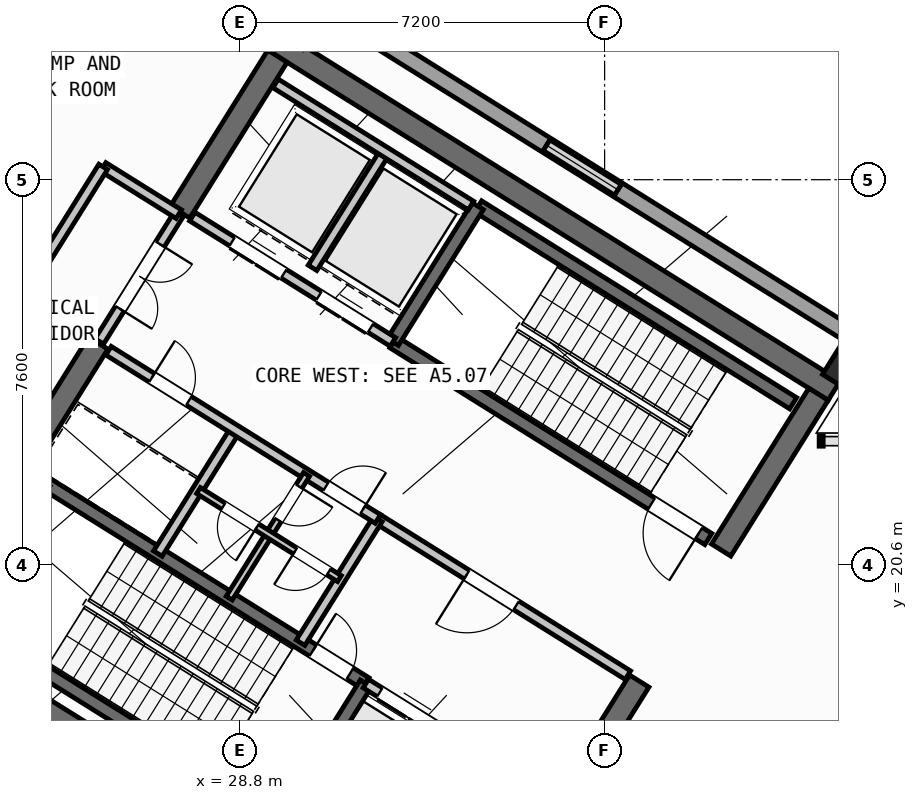
"""IFC4 building model, lengths in metres.
Left out: names, types, materials, properties, quantities, classifications, styles, units other than length and angle.
Written with IfcOpenShell. Run it as: python <this file> out.ifc"""

import sys

from ifc_helpers import new_model, si_unit, direction, frame, frame_2d, origin, origin_2d, place, context, subcontext, project, spatial, rectangle, hollow_rectangle, extrude, source, transform, mapped, element, fill, save


model = new_model("IFC4")
c1 = context("Model", 3, precision=1e-05, world=origin(), true_north=direction((0.0, 1.0)))
c2 = subcontext(c1, "Body", "Model", "MODEL_VIEW")
j1 = project(units=[si_unit("LENGTHUNIT", "METRE"), si_unit("PLANEANGLEUNIT", "RADIAN")], contexts=[c1])
p1 = place(None, origin())
s1 = spatial("IfcSite", under=j1, at=p1, CompositionType="ELEMENT")
p2 = place(p1, origin())
s2 = spatial("IfcBuilding", under=s1, at=p2, CompositionType="ELEMENT")
p3 = place(p2, frame((0.0, 0.0, 245.7)))
s3 = spatial("IfcBuildingStorey", under=s2, at=p3, CompositionType="ELEMENT", Elevation=245.7)
p4 = place(p3, frame((40.531, 24.036, 0.0), z_axis=(0.0, 0.0, 1.0), x_axis=(-0.848048787466, 0.529918157905, 0.0)))
e1 = element("IfcWall", 1, at=p4, inside=s3, PredefinedType="SHEAR", context=c2, shape_type="SweptSolid", body=[
    extrude(rectangle(XDim=13.04, YDim=0.45, at=frame_2d((6.52, 0.0))), origin(), (0.0, 0.0, 1.0), 5.15),
])
p5 = place(p3, frame((33.324, 12.503, 0.0), z_axis=(0.0, 0.0, 1.0), x_axis=(-0.848043529849, 0.529926571782, 0.0)))
e2 = element("IfcWall", 2, at=p5, inside=s3, PredefinedType="SHEAR", context=c2, shape_type="SweptSolid", body=[
    extrude(rectangle(XDim=13.04, YDim=0.45, at=frame_2d((6.52, 0.0))), origin(), (0.0, 0.0, 1.0), 5.15),
])
p6 = place(p3, frame((40.221, 23.965, 0.0), z_axis=(0.0, 0.0, 1.0), x_axis=(-0.529902075036, -0.848058836916, 0.0)))
e3 = element("IfcWall", 3, at=p6, inside=s3, PredefinedType="SHEAR", context=c2, shape_type="SweptSolid", body=[
    extrude(rectangle(XDim=3.625, YDim=0.45, at=frame_2d((1.812, 0.0))), origin(), (0.0, 0.0, 1.0), 5.15),
])
p7 = place(p3, frame((36.683, 18.304, 0.0), z_axis=(0.0, 0.0, 1.0), x_axis=(-0.529904039071, -0.848057609704, 0.0)))
e4 = element("IfcWall", 4, at=p7, inside=s3, PredefinedType="SHEAR", context=c2, shape_type="SweptSolid", body=[
    extrude(rectangle(XDim=6.475, YDim=0.45, at=frame_2d((3.238, 0.0))), origin(), (0.0, 0.0, 1.0), 5.15),
])
p8 = place(p3, frame((29.544, 30.636, 0.0), z_axis=(0.0, 0.0, 1.0), x_axis=(-0.529902075036, -0.848058836916, 0.0)))
e5 = element("IfcWall", 5, at=p8, inside=s3, PredefinedType="SHEAR", context=c2, shape_type="SweptSolid", body=[
    extrude(rectangle(XDim=3.625, YDim=0.45, at=frame_2d((1.812, 0.0))), origin(), (0.0, 0.0, 1.0), 5.15),
])
p9 = place(p3, frame((26.007, 24.976, 0.0), z_axis=(0.0, 0.0, 1.0), x_axis=(-0.529931155655, -0.848040665456, 0.0)))
e6 = element("IfcWall", 6, at=p9, inside=s3, PredefinedType="SHEAR", context=c2, shape_type="SweptSolid", body=[
    extrude(rectangle(XDim=6.475, YDim=0.45, at=frame_2d((3.238, 0.0))), origin(), (0.0, 0.0, 1.0), 5.15),
])
m1 = source(origin(), c2, "Body", "SweptSolid", [
    extrude(hollow_rectangle(XDim=0.7, YDim=0.7, WallThickness=0.028, at=origin_2d()), origin(), (0.0, 0.0, 1.0), 5.4),
])
p10 = place(p3, frame((40.783, 24.469, 0.0), z_axis=(0.0, 0.0, 1.0), x_axis=(-0.848048096156, 0.529919264233, 0.0)))
e7 = element("IfcColumn", 7, at=p10, inside=s3, PredefinedType="COLUMN", context=c2, shape_type="MappedRepresentation", body=[
    mapped(m1, transform((0.0, 0.0, 0.0), scale=1.0)),
])
p11 = place(p3, frame((29.268, 6.429, 0.0), z_axis=(0.0, 0.0, 1.0), x_axis=(-0.848049971435, 0.529916263149, 0.0)))
e8 = element("IfcWall", 8, at=p11, inside=s3, PredefinedType="STANDARD", context=c2, shape_type="SweptSolid", body=[
    extrude(rectangle(XDim=31.588, YDim=0.32, at=frame_2d((15.794, 0.0))), origin(), (0.0, 0.0, 1.0), 5.15),
])
p12 = place(p11, frame((5.782, 0.0, 0.85)))
e9 = element("IfcOpeningElement", 9, at=p12, cuts=e8, PredefinedType="OPENING", context=c2, shape_type="SweptSolid", body=[
    extrude(rectangle(XDim=1.7, YDim=1.6, at=frame_2d((0.85, 0.8))), frame((0.0, 0.17, 0.0), z_axis=(0.0, -1.0, 0.0), x_axis=(1.0, 0.0, 0.0)), (0.0, 0.0, 1.0), 0.34),
])
p13 = place(p3, frame((14.138, 41.825, 0.0), z_axis=(0.0, 0.0, 1.0), x_axis=(0.848046498049, -0.529921821731, 0.0)))
e10 = element("IfcWall", 10, at=p13, inside=s3, PredefinedType="STANDARD", context=c2, shape_type="SweptSolid", body=[
    extrude(rectangle(XDim=31.588, YDim=0.32, at=frame_2d((15.794, 0.0))), origin(), (0.0, 0.0, 1.0), 5.15),
])
p14 = place(p13, frame((2.144, 0.0, 0.85)))
e11 = element("IfcOpeningElement", 11, at=p14, cuts=e10, PredefinedType="OPENING", context=c2, shape_type="SweptSolid", body=[
    extrude(rectangle(XDim=1.7, YDim=1.6, at=frame_2d((0.85, 0.8))), frame((0.0, 0.17, 0.0), z_axis=(0.0, -1.0, 0.0), x_axis=(1.0, 0.0, 0.0)), (0.0, 0.0, 1.0), 0.34),
])
p15 = place(p13, frame((8.544, 0.0, 0.85)))
e12 = element("IfcOpeningElement", 12, at=p15, cuts=e10, PredefinedType="OPENING", context=c2, shape_type="SweptSolid", body=[
    extrude(rectangle(XDim=1.7, YDim=1.6, at=frame_2d((0.85, 0.8))), frame((0.0, 0.17, 0.0), z_axis=(0.0, -1.0, 0.0), x_axis=(1.0, 0.0, 0.0)), (0.0, 0.0, 1.0), 0.34),
])
p16 = place(p13, frame((14.944, 0.0, 0.85)))
e13 = element("IfcOpeningElement", 13, at=p16, cuts=e10, PredefinedType="OPENING", context=c2, shape_type="SweptSolid", body=[
    extrude(rectangle(XDim=1.7, YDim=1.6, at=frame_2d((0.85, 0.8))), frame((0.0, 0.17, 0.0), z_axis=(0.0, -1.0, 0.0), x_axis=(1.0, 0.0, 0.0)), (0.0, 0.0, 1.0), 0.34),
])
p17 = place(p13, frame((24.408, 0.0, 0.85)))
e14 = element("IfcOpeningElement", 14, at=p17, cuts=e10, PredefinedType="OPENING", context=c2, shape_type="SweptSolid", body=[
    extrude(rectangle(XDim=1.7, YDim=1.6, at=frame_2d((0.85, 0.8))), frame((0.0, 0.17, 0.0), z_axis=(0.0, -1.0, 0.0), x_axis=(1.0, 0.0, 0.0)), (0.0, 0.0, 1.0), 0.34),
])
p18 = place(p3, frame((29.605, 15.581, 0.0), z_axis=(0.0, 0.0, 1.0), x_axis=(-0.848036911448, 0.529937163087, 0.0)))
e15 = element("IfcWall", 15, at=p18, inside=s3, PredefinedType="SHEAR", context=c2, shape_type="SweptSolid", body=[
    extrude(rectangle(XDim=7.46, YDim=0.26, at=frame_2d((3.73, 0.0))), origin(), (0.0, 0.0, 1.0), 5.15),
])
p19 = place(p3, frame((31.28, 18.261, 0.0), z_axis=(0.0, 0.0, 1.0), x_axis=(-0.848051618787, 0.529913626805, 0.0)))
e16 = element("IfcWall", 16, at=p19, inside=s3, PredefinedType="SHEAR", context=c2, shape_type="SweptSolid", body=[
    extrude(rectangle(XDim=7.46, YDim=0.26, at=frame_2d((3.73, 0.0))), origin(), (0.0, 0.0, 1.0), 5.15),
])
p20 = place(p19, frame((0.36, 0.0, 0.0)))
e17 = element("IfcOpeningElement", 17, at=p20, cuts=e16, PredefinedType="OPENING", context=c2, shape_type="SweptSolid", body=[
    extrude(rectangle(XDim=0.86, YDim=2.05, at=frame_2d((0.43, 1.025))), frame((0.0, 0.14, 0.0), z_axis=(0.0, -1.0, 0.0), x_axis=(1.0, 0.0, 0.0)), (0.0, 0.0, 1.0), 0.28),
])
p21 = place(p3, frame((31.288, 18.256, 0.0), z_axis=(0.0, 0.0, 1.0), x_axis=(-0.529943379326, -0.848033026897, 0.0)))
e18 = element("IfcWall", 18, at=p21, inside=s3, PredefinedType="SHEAR", context=c2, shape_type="SweptSolid", body=[
    extrude(rectangle(XDim=3.16, YDim=0.26, at=frame_2d((1.58, 0.0))), origin(), (0.0, 0.0, 1.0), 5.15),
])
p22 = place(p3, frame((39.721, 23.788, 0.0), z_axis=(0.0, 0.0, 1.0), x_axis=(-0.848054434086, 0.529909121291, 0.0)))
e19 = element("IfcWall", 19, at=p22, inside=s3, PredefinedType="SHEAR", context=c2, shape_type="SweptSolid", body=[
    extrude(rectangle(XDim=7.33, YDim=0.26, at=frame_2d((3.665, 0.0))), origin(), (0.0, 0.0, 1.0), 5.15),
])
p23 = place(p3, frame((38.046, 21.108, 0.0), z_axis=(0.0, 0.0, 1.0), x_axis=(-0.848054434086, 0.529909121291, 0.0)))
e20 = element("IfcWall", 20, at=p23, inside=s3, PredefinedType="SHEAR", context=c2, shape_type="SweptSolid", body=[
    extrude(rectangle(XDim=7.33, YDim=0.26, at=frame_2d((3.665, 0.0))), origin(), (0.0, 0.0, 1.0), 5.15),
])
p24 = place(p23, frame((0.22, 0.0, 0.0)))
e21 = element("IfcOpeningElement", 21, at=p24, cuts=e20, PredefinedType="OPENING", context=c2, shape_type="SweptSolid", body=[
    extrude(rectangle(XDim=1.1, YDim=2.1, at=frame_2d((0.55, 1.05))), frame((0.0, 0.14, 0.0), z_axis=(0.0, -1.0, 0.0), x_axis=(1.0, 0.0, 0.0)), (0.0, 0.0, 1.0), 0.28),
])
p25 = place(p3, frame((33.496, 27.677, 0.0), z_axis=(0.0, 0.0, 1.0), x_axis=(-0.529908658664, -0.84805472316, 0.0)))
e22 = element("IfcWall", 22, at=p25, inside=s3, PredefinedType="SHEAR", context=c2, shape_type="SweptSolid", body=[
    extrude(rectangle(XDim=3.16, YDim=0.26, at=frame_2d((1.58, 0.0))), origin(), (0.0, 0.0, 1.0), 5.15),
])
p26 = place(p3, frame((34.933, 15.978, 0.0), z_axis=(0.0, 0.0, 1.0), x_axis=(-0.848055739377, 0.529907032327, 0.0)))
e23 = element("IfcWall", 23, at=p26, inside=s3, PredefinedType="STANDARD", context=c2, shape_type="SweptSolid", body=[
    extrude(rectangle(XDim=4.298, YDim=0.2, at=frame_2d((2.149, 0.0))), origin(), (0.0, 0.0, 1.0), 5.14),
])
p27 = place(p26, frame((0.448, 0.0, 0.0)))
e24 = element("IfcOpeningElement", 24, at=p27, cuts=e23, PredefinedType="OPENING", context=c2, shape_type="SweptSolid", body=[
    extrude(rectangle(XDim=1.3, YDim=2.2, at=frame_2d((0.65, 1.1))), frame((0.0, 0.11, 0.0), z_axis=(0.0, -1.0, 0.0), x_axis=(1.0, 0.0, 0.0)), (0.0, 0.0, 1.0), 0.22),
])
p28 = place(p26, frame((2.523, 0.0, 0.0)))
e25 = element("IfcOpeningElement", 25, at=p28, cuts=e23, PredefinedType="OPENING", context=c2, shape_type="SweptSolid", body=[
    extrude(rectangle(XDim=1.45, YDim=2.25, at=frame_2d((0.725, 1.125))), frame((0.0, 0.11, 0.0), z_axis=(0.0, -1.0, 0.0), x_axis=(1.0, 0.0, 0.0)), (0.0, 0.0, 1.0), 0.22),
])
p29 = place(p3, frame((36.459, 18.421, 0.0), z_axis=(0.0, 0.0, 1.0), x_axis=(-0.848059591691, 0.529900867089, 0.0)))
e26 = element("IfcWall", 26, at=p29, inside=s3, PredefinedType="STANDARD", context=c2, shape_type="SweptSolid", body=[
    extrude(rectangle(XDim=5.818, YDim=0.2, at=frame_2d((2.909, 0.0))), origin(), (0.0, 0.0, 1.0), 5.14),
])
p30 = place(p29, frame((2.598, 0.0, 0.0)))
e27 = element("IfcOpeningElement", 27, at=p30, cuts=e26, PredefinedType="OPENING", context=c2, shape_type="SweptSolid", body=[
    extrude(rectangle(XDim=1.15, YDim=2.1, at=frame_2d((0.575, 1.05))), frame((0.0, 0.11, 0.0), z_axis=(0.0, -1.0, 0.0), x_axis=(1.0, 0.0, 0.0)), (0.0, 0.0, 1.0), 0.22),
])
p31 = place(p3, frame((31.822, 24.998, 0.0), z_axis=(0.0, 0.0, 1.0), x_axis=(-0.848054125777, 0.529909614701, 0.0)))
e28 = element("IfcWall", 28, at=p31, inside=s3, PredefinedType="STANDARD", context=c2, shape_type="SweptSolid", body=[
    extrude(rectangle(XDim=4.668, YDim=0.2, at=frame_2d((2.334, 0.0))), origin(), (0.0, 0.0, 1.0), 5.14),
])
p32 = place(p31, frame((0.52, 0.0, 0.0)))
e29 = element("IfcOpeningElement", 29, at=p32, cuts=e28, PredefinedType="OPENING", context=c2, shape_type="SweptSolid", body=[
    extrude(rectangle(XDim=1.2, YDim=2.15, at=frame_2d((0.6, 1.075))), frame((0.0, 0.11, 0.0), z_axis=(0.0, -1.0, 0.0), x_axis=(1.0, 0.0, 0.0)), (0.0, 0.0, 1.0), 0.22),
])
p33 = place(p31, frame((2.54, 0.0, 0.0)))
e30 = element("IfcOpeningElement", 30, at=p33, cuts=e28, PredefinedType="OPENING", context=c2, shape_type="SweptSolid", body=[
    extrude(rectangle(XDim=1.2, YDim=2.15, at=frame_2d((0.6, 1.075))), frame((0.0, 0.11, 0.0), z_axis=(0.0, -1.0, 0.0), x_axis=(1.0, 0.0, 0.0)), (0.0, 0.0, 1.0), 0.22),
])
p34 = place(p3, frame((31.645, 28.716, 0.0), z_axis=(0.0, 0.0, 1.0), x_axis=(-0.52986693015, -0.848080795876, 0.0)))
e31 = element("IfcWall", 31, at=p34, inside=s3, PredefinedType="STANDARD", context=c2, shape_type="SweptSolid", body=[
    extrude(rectangle(XDim=2.66, YDim=0.2, at=frame_2d((1.33, 0.0))), origin(), (0.0, 0.0, 1.0), 5.14),
])
p35 = place(p3, frame((33.363, 27.69, 0.0), z_axis=(0.0, 0.0, 1.0), x_axis=(-0.84804957148, 0.529916903215, 0.0)))
e32 = element("IfcWall", 32, at=p35, inside=s3, PredefinedType="STANDARD", context=c2, shape_type="SweptSolid", body=[
    extrude(rectangle(XDim=4.548, YDim=0.2, at=frame_2d((2.274, 0.0))), origin(), (0.0, 0.0, 1.0), 5.14),
])
for number, where, z_axis, x_axis in (
    (33, (31.525, 21.504, 0.0), (0.0, 0.0, 1.0), (-0.53, -0.848, 0.0)),
    (34, (28.71, 23.263, 0.0), (0.0, 0.0, 1.0), (-0.53, -0.848, 0.0)),
):
    element("IfcWall", number, at=place(p3, frame(where, z_axis=z_axis, x_axis=x_axis)), inside=s3, PredefinedType="STANDARD", context=c2, shape_type="SweptSolid", body=[
        extrude(rectangle(XDim=2.88, YDim=0.2, at=frame_2d((1.44, 0.0))), origin(), (0.0, 0.0, 1.0), 5.14),
    ])
p36 = place(p3, frame((31.525, 21.504, 0.0), z_axis=(0.0, 0.0, 1.0), x_axis=(-0.848042066329, 0.529928913853, 0.0)))
e35 = element("IfcWall", 35, at=p36, inside=s3, PredefinedType="STANDARD", context=c2, shape_type="SweptSolid", body=[
    extrude(rectangle(XDim=6.268, YDim=0.2, at=frame_2d((3.134, 0.0))), origin(), (0.0, 0.0, 1.0), 5.14),
])
p37 = place(p36, frame((4.4, 0.0, 0.0)))
e36 = element("IfcOpeningElement", 36, at=p37, cuts=e35, PredefinedType="OPENING", context=c2, shape_type="SweptSolid", body=[
    extrude(rectangle(XDim=0.86, YDim=2.05, at=frame_2d((0.43, 1.025))), frame((0.0, 0.11, 0.0), z_axis=(0.0, -1.0, 0.0), x_axis=(1.0, 0.0, 0.0)), (0.0, 0.0, 1.0), 0.22),
])
p38 = place(p36, frame((0.35, 0.0, 0.0)))
e37 = element("IfcOpeningElement", 37, at=p38, cuts=e35, PredefinedType="OPENING", context=c2, shape_type="SweptSolid", body=[
    extrude(rectangle(XDim=0.86, YDim=2.05, at=frame_2d((0.43, 1.025))), frame((0.0, 0.11, 0.0), z_axis=(0.0, -1.0, 0.0), x_axis=(1.0, 0.0, 0.0)), (0.0, 0.0, 1.0), 0.22),
])
p39 = place(p3, frame((30.117, 22.384, 0.0), z_axis=(0.0, 0.0, 1.0), x_axis=(-0.529951914384, -0.848027693204, 0.0)))
e38 = element("IfcWall", 38, at=p39, inside=s3, PredefinedType="PLUMBINGWALL", context=c2, shape_type="SweptSolid", body=[
    extrude(rectangle(XDim=1.4, YDim=0.14, at=frame_2d((0.7, 0.0))), origin(), (0.0, 0.0, 1.0), 5.14),
])
p40 = place(p39, frame((0.28, 0.0, 0.0)))
e39 = element("IfcOpeningElement", 39, at=p40, cuts=e38, PredefinedType="OPENING", context=c2, shape_type="SweptSolid", body=[
    extrude(rectangle(XDim=0.78, YDim=2.05, at=frame_2d((0.39, 1.025))), frame((0.0, 0.08, 0.0), z_axis=(0.0, -1.0, 0.0), x_axis=(1.0, 0.0, 0.0)), (0.0, 0.0, 1.0), 0.16),
])
p41 = place(p3, frame((29.375, 21.196, 0.0), z_axis=(0.0, 0.0, 1.0), x_axis=(-0.529865479138, -0.848081702443, 0.0)))
e40 = element("IfcWall", 40, at=p41, inside=s3, PredefinedType="PLUMBINGWALL", context=c2, shape_type="SweptSolid", body=[
    extrude(rectangle(XDim=1.48, YDim=0.14, at=frame_2d((0.74, 0.0))), origin(), (0.0, 0.0, 1.0), 5.14),
])
p42 = place(p3, frame((30.766, 20.327, 0.0), z_axis=(0.0, 0.0, 1.0), x_axis=(-0.848052663127, 0.529911955482, 0.0)))
e41 = element("IfcWall", 41, at=p42, inside=s3, PredefinedType="PLUMBINGWALL", context=c2, shape_type="SweptSolid", body=[
    extrude(rectangle(XDim=3.28, YDim=0.14, at=frame_2d((1.64, 0.0))), origin(), (0.0, 0.0, 1.0), 5.14),
])
p43 = place(p42, frame((0.25, 0.0, 0.0)))
e42 = element("IfcOpeningElement", 42, at=p43, cuts=e41, PredefinedType="OPENING", context=c2, shape_type="SweptSolid", body=[
    extrude(rectangle(XDim=0.78, YDim=2.05, at=frame_2d((0.39, 1.025))), frame((0.0, 0.08, 0.0), z_axis=(0.0, -1.0, 0.0), x_axis=(1.0, 0.0, 0.0)), (0.0, 0.0, 1.0), 0.16),
])
p44 = place(p42, frame((1.92, 0.0, 0.0)))
e43 = element("IfcOpeningElement", 43, at=p44, cuts=e41, PredefinedType="OPENING", context=c2, shape_type="SweptSolid", body=[
    extrude(rectangle(XDim=0.78, YDim=2.05, at=frame_2d((0.39, 1.025))), frame((0.0, 0.08, 0.0), z_axis=(0.0, -1.0, 0.0), x_axis=(1.0, 0.0, 0.0)), (0.0, 0.0, 1.0), 0.16),
])
p45 = place(p3, frame((27.596, 27.52, 0.0), z_axis=(0.0, 0.0, 1.0), x_axis=(-0.529865479138, -0.848081702443, 0.0)))
e44 = element("IfcWall", 44, at=p45, inside=s3, PredefinedType="STANDARD", context=c2, shape_type="SweptSolid", body=[
    extrude(rectangle(XDim=2.96, YDim=0.2, at=frame_2d((1.48, 0.0))), origin(), (0.0, 0.0, 1.0), 5.14),
])
p46 = place(p45, frame((0.7, 0.0, 0.0)))
e45 = element("IfcOpeningElement", 45, at=p46, cuts=e44, PredefinedType="OPENING", context=c2, shape_type="SweptSolid", body=[
    extrude(rectangle(XDim=1.5, YDim=2.15, at=frame_2d((0.75, 1.075))), frame((0.0, 0.11, 0.0), z_axis=(0.0, -1.0, 0.0), x_axis=(1.0, 0.0, 0.0)), (0.0, 0.0, 1.0), 0.22),
])
p47 = place(p3, frame((28.188, 15.182, 0.0), z_axis=(0.0, 0.0, 1.0), x_axis=(-0.848049646362, 0.529916783378, 0.0)))
e46 = element("IfcWall", 46, at=p47, inside=s3, PredefinedType="STANDARD", context=c2, shape_type="SweptSolid", body=[
    extrude(rectangle(XDim=6.678, YDim=0.2, at=frame_2d((3.339, 0.0))), origin(), (0.0, 0.0, 1.0), 5.14),
])
p48 = place(p3, frame((27.596, 27.52, 0.0), z_axis=(0.0, 0.0, 1.0), x_axis=(-0.848037269931, 0.529936589422, 0.0)))
e47 = element("IfcWall", 47, at=p48, inside=s3, PredefinedType="STANDARD", context=c2, shape_type="SweptSolid", body=[
    extrude(rectangle(XDim=1.76, YDim=0.2, at=frame_2d((0.88, 0.0))), origin(), (0.0, 0.0, 1.0), 5.14),
])
p49 = place(p3, frame((26.104, 28.453, 0.0), z_axis=(0.0, 0.0, 1.0), x_axis=(-0.529880066358, -0.848072588448, 0.0)))
e48 = element("IfcWall", 48, at=p49, inside=s3, PredefinedType="STANDARD", context=c2, shape_type="SweptSolid", body=[
    extrude(rectangle(XDim=2.4, YDim=0.2, at=frame_2d((1.2, 0.0))), origin(), (0.0, 0.0, 1.0), 5.14),
])
m2 = source(origin(), c2, "Body", "SweptSolid", [
    extrude(rectangle(XDim=1.7, YDim=1.6, at=frame_2d((0.85, 0.8))), frame((0.0, 0.03, 0.0), z_axis=(0.0, -1.0, 0.0), x_axis=(1.0, 0.0, 0.0)), (0.0, 0.0, 1.0), 0.06),
])
p50 = place(p17, origin())
e49 = element("IfcWindow", 49, at=p50, inside=s3, PartitioningType="SINGLE_PANEL", PredefinedType="WINDOW", context=c2, shape_type="MappedRepresentation", body=[
    mapped(m2, transform((0.0, 0.0, 0.0), scale=1.0)),
])
fill(e14, e49)
m3 = source(origin(), c2, "Body", "SweptSolid", [
    extrude(rectangle(XDim=0.86, YDim=2.05, at=frame_2d((0.43, 1.025))), frame((0.0, 0.025, 0.0), z_axis=(0.0, -1.0, 0.0), x_axis=(1.0, 0.0, 0.0)), (0.0, 0.0, 1.0), 0.05),
])
p51 = place(p20, frame((0.86, 0.0, 0.0), z_axis=(0.0, 0.0, 1.0), x_axis=(-1.0, 0.0, 0.0)))
e50 = element("IfcDoor", 50, at=p51, inside=s3, OperationType="SINGLE_SWING_LEFT", PredefinedType="DOOR", context=c2, shape_type="MappedRepresentation", body=[
    mapped(m3, transform((0.0, 0.0, 0.0), scale=1.0)),
])
fill(e17, e50)
m4 = source(origin(), c2, "Body", "SweptSolid", [
    extrude(rectangle(XDim=1.1, YDim=2.1, at=frame_2d((0.55, 1.05))), frame((0.0, 0.025, 0.0), z_axis=(0.0, -1.0, 0.0), x_axis=(1.0, 0.0, 0.0)), (0.0, 0.0, 1.0), 0.05),
])
p52 = place(p24, origin())
e51 = element("IfcDoor", 51, at=p52, inside=s3, OperationType="SINGLE_SWING_LEFT", PredefinedType="DOOR", context=c2, shape_type="MappedRepresentation", body=[
    mapped(m4, transform((0.0, 0.0, 0.0), scale=1.0)),
])
fill(e21, e51)
m5 = source(origin(), c2, "Body", "SweptSolid", [
    extrude(rectangle(XDim=1.15, YDim=2.1, at=frame_2d((0.575, 1.05))), frame((0.0, 0.025, 0.0), z_axis=(0.0, -1.0, 0.0), x_axis=(1.0, 0.0, 0.0)), (0.0, 0.0, 1.0), 0.05),
])
p53 = place(p30, origin())
e52 = element("IfcDoor", 52, at=p53, inside=s3, OperationType="SINGLE_SWING_RIGHT", PredefinedType="DOOR", context=c2, shape_type="MappedRepresentation", body=[
    mapped(m5, transform((0.0, 0.0, 0.0), scale=1.0)),
])
fill(e27, e52)
m6 = source(origin(), c2, "Body", "SweptSolid", [
    extrude(rectangle(XDim=1.45, YDim=2.25, at=frame_2d((0.725, 1.125))), frame((0.0, 0.025, 0.0), z_axis=(0.0, -1.0, 0.0), x_axis=(1.0, 0.0, 0.0)), (0.0, 0.0, 1.0), 0.05),
])
p54 = place(p28, origin())
e53 = element("IfcDoor", 53, at=p54, inside=s3, OperationType="DOUBLE_DOOR_SLIDING", PredefinedType="DOOR", context=c2, shape_type="MappedRepresentation", body=[
    mapped(m6, transform((0.0, 0.0, 0.0), scale=1.0)),
])
fill(e25, e53)
m7 = source(origin(), c2, "Body", "SweptSolid", [
    extrude(rectangle(XDim=1.2, YDim=2.15, at=frame_2d((0.6, 1.075))), frame((0.0, 0.025, 0.0), z_axis=(0.0, -1.0, 0.0), x_axis=(1.0, 0.0, 0.0)), (0.0, 0.0, 1.0), 0.05),
])
p55 = place(p32, origin())
e54 = element("IfcDoor", 54, at=p55, inside=s3, OperationType="DOUBLE_DOOR_SLIDING", PredefinedType="DOOR", context=c2, shape_type="MappedRepresentation", body=[
    mapped(m7, transform((0.0, 0.0, 0.0), scale=1.0)),
])
fill(e29, e54)
p56 = place(p33, origin())
e55 = element("IfcDoor", 55, at=p56, inside=s3, OperationType="DOUBLE_DOOR_SLIDING", PredefinedType="DOOR", context=c2, shape_type="MappedRepresentation", body=[
    mapped(m7, transform((0.0, 0.0, 0.0), scale=1.0)),
])
fill(e30, e55)
p57 = place(p37, frame((0.86, 0.0, 0.0), z_axis=(0.0, 0.0, 1.0), x_axis=(-1.0, 0.0, 0.0)))
e56 = element("IfcDoor", 56, at=p57, inside=s3, OperationType="SINGLE_SWING_LEFT", PredefinedType="DOOR", context=c2, shape_type="MappedRepresentation", body=[
    mapped(m3, transform((0.0, 0.0, 0.0), scale=1.0)),
])
fill(e36, e56)
p58 = place(p38, frame((0.86, 0.0, 0.0), z_axis=(0.0, 0.0, 1.0), x_axis=(-1.0, 0.0, 0.0)))
e57 = element("IfcDoor", 57, at=p58, inside=s3, OperationType="SINGLE_SWING_RIGHT", PredefinedType="DOOR", context=c2, shape_type="MappedRepresentation", body=[
    mapped(m3, transform((0.0, 0.0, 0.0), scale=1.0)),
])
fill(e37, e57)
m8 = source(origin(), c2, "Body", "SweptSolid", [
    extrude(rectangle(XDim=0.78, YDim=2.05, at=frame_2d((0.39, 1.025))), frame((0.0, 0.025, 0.0), z_axis=(0.0, -1.0, 0.0), x_axis=(1.0, 0.0, 0.0)), (0.0, 0.0, 1.0), 0.05),
])
p59 = place(p40, origin())
e58 = element("IfcDoor", 58, at=p59, inside=s3, OperationType="SINGLE_SWING_LEFT", PredefinedType="DOOR", context=c2, shape_type="MappedRepresentation", body=[
    mapped(m8, transform((0.0, 0.0, 0.0), scale=1.0)),
])
fill(e39, e58)
p60 = place(p43, origin())
e59 = element("IfcDoor", 59, at=p60, inside=s3, OperationType="SINGLE_SWING_RIGHT", PredefinedType="DOOR", context=c2, shape_type="MappedRepresentation", body=[
    mapped(m8, transform((0.0, 0.0, 0.0), scale=1.0)),
])
fill(e42, e59)
p61 = place(p44, origin())
e60 = element("IfcDoor", 60, at=p61, inside=s3, OperationType="SINGLE_SWING_LEFT", PredefinedType="DOOR", context=c2, shape_type="MappedRepresentation", body=[
    mapped(m8, transform((0.0, 0.0, 0.0), scale=1.0)),
])
fill(e43, e60)
m9 = source(origin(), c2, "Body", "SweptSolid", [
    extrude(rectangle(XDim=1.5, YDim=2.15, at=frame_2d((0.75, 1.075))), frame((0.0, 0.025, 0.0), z_axis=(0.0, -1.0, 0.0), x_axis=(1.0, 0.0, 0.0)), (0.0, 0.0, 1.0), 0.05),
])
p62 = place(p46, origin())
e61 = element("IfcDoor", 61, at=p62, inside=s3, OperationType="DOUBLE_DOOR_SINGLE_SWING", PredefinedType="DOOR", context=c2, shape_type="MappedRepresentation", body=[
    mapped(m9, transform((0.0, 0.0, 0.0), scale=1.0)),
])
fill(e45, e61)
save(model, sys.argv[1])
